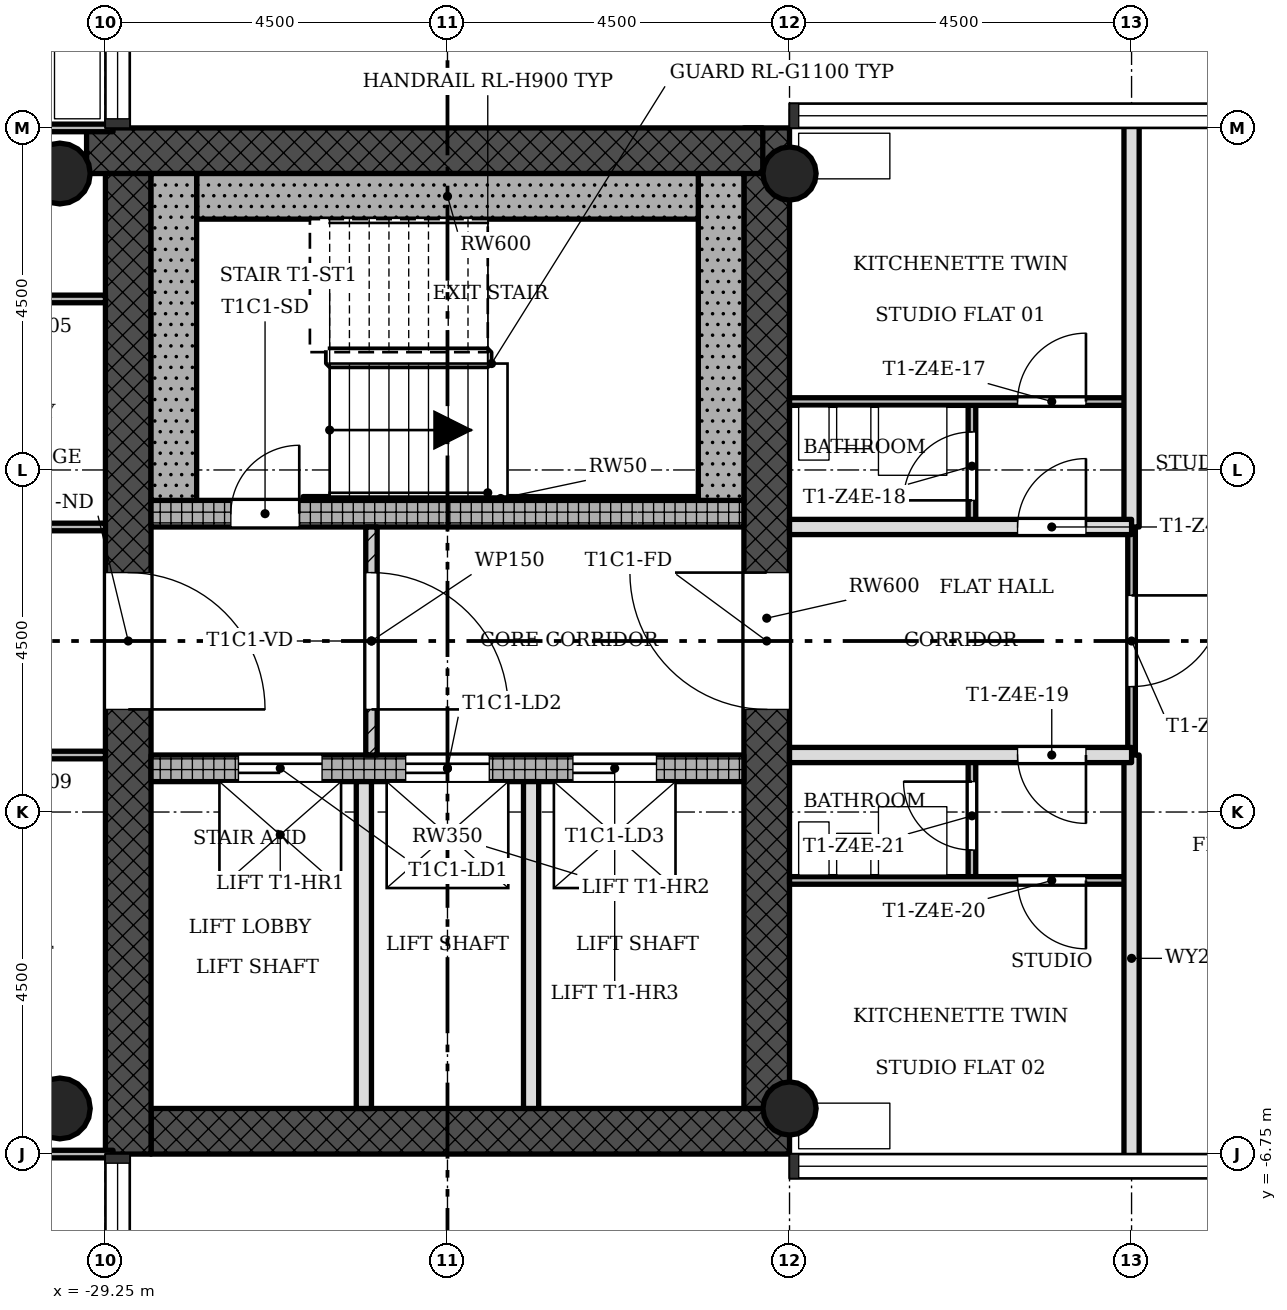
"""IFC4 building model, lengths in metres.
Left out: names, types, materials, properties, quantities, classifications, styles, units other than length and angle.
Written with IfcOpenShell. Run it as: python <this file> out.ifc"""

import sys

from ifc_helpers import new_model, si_unit, direction, frame, frame_2d, origin, origin_2d, place, context, subcontext, project, spatial, rectangle, hollow_circle, extrude, element, fill, save


model = new_model("IFC4")
c1 = context("Model", 3, precision=1e-05, world=origin(), true_north=direction((0.0, 1.0)))
c2 = subcontext(c1, "Body", "Model", "MODEL_VIEW")
j1 = project(units=[si_unit("LENGTHUNIT", "METRE"), si_unit("PLANEANGLEUNIT", "RADIAN")], contexts=[c1])
p1 = place(None, origin())
s1 = spatial("IfcSite", under=j1, at=p1, CompositionType="ELEMENT")
p2 = place(p1, origin())
s2 = spatial("IfcBuilding", under=s1, at=p2, CompositionType="ELEMENT")
p3 = place(p2, frame((0.0, 0.0, 213.0)))
s3 = spatial("IfcBuildingStorey", under=s2, at=p3, CompositionType="ELEMENT", Elevation=213.0)
p4 = place(p3, frame((-28.65, -6.45, 0.0), z_axis=(0.0, 0.0, 1.0), x_axis=(1.0, 0.0, 0.0)))
e1 = element("IfcWall", 1, at=p4, inside=s3, PredefinedType="SHEAR", context=c2, shape_type="SweptSolid", body=[
    extrude(rectangle(XDim=8.4, YDim=0.6, at=frame_2d((4.2, 0.0))), origin(), (0.0, 0.0, 1.0), 3.4),
])
p5 = place(p3, frame((-20.55, -6.15, 0.0), z_axis=(0.0, 0.0, 1.0), x_axis=(0.0, 1.0, 0.0)))
e2 = element("IfcWall", 2, at=p5, inside=s3, PredefinedType="SHEAR", context=c2, shape_type="SweptSolid", body=[
    extrude(rectangle(XDim=12.9, YDim=0.6, at=frame_2d((6.45, 0.0))), origin(), (0.0, 0.0, 1.0), 3.4),
])
p6 = place(p5, frame((5.25, 0.0, 0.0)))
e3 = element("IfcOpeningElement", 3, at=p6, cuts=e2, PredefinedType="OPENING", context=c2, shape_type="SweptSolid", body=[
    extrude(rectangle(XDim=1.8, YDim=2.1, at=frame_2d((0.9, 1.05))), frame((0.0, 0.31, 0.0), z_axis=(0.0, -1.0, 0.0), x_axis=(1.0, 0.0, 0.0)), (0.0, 0.0, 1.0), 0.62),
])
p7 = place(p3, frame((-20.602, 6.45, 0.0), z_axis=(0.0, 0.0, 1.0), x_axis=(-1.0, 0.0, 0.0)))
e4 = element("IfcWall", 4, at=p7, inside=s3, PredefinedType="SHEAR", context=c2, shape_type="SweptSolid", body=[
    extrude(rectangle(XDim=8.896, YDim=0.6, at=frame_2d((4.448, 0.0))), origin(), (0.0, 0.0, 1.0), 3.4),
])
p8 = place(p3, frame((-28.95, 6.15, 0.0), z_axis=(0.0, 0.0, 1.0), x_axis=(0.0, -1.0, 0.0)))
e5 = element("IfcWall", 5, at=p8, inside=s3, PredefinedType="SHEAR", context=c2, shape_type="SweptSolid", body=[
    extrude(rectangle(XDim=12.9, YDim=0.6, at=frame_2d((6.45, 0.0))), origin(), (0.0, 0.0, 1.0), 3.4),
])
p9 = place(p8, frame((5.25, 0.0, 0.0)))
e6 = element("IfcOpeningElement", 6, at=p9, cuts=e5, PredefinedType="OPENING", context=c2, shape_type="SweptSolid", body=[
    extrude(rectangle(XDim=1.8, YDim=2.1, at=frame_2d((0.9, 1.05))), frame((0.0, 0.31, 0.0), z_axis=(0.0, -1.0, 0.0), x_axis=(1.0, 0.0, 0.0)), (0.0, 0.0, 1.0), 0.62),
])
p10 = place(p3, frame((-28.65, -1.675, 0.0), z_axis=(0.0, 0.0, 1.0), x_axis=(1.0, 0.0, 0.0)))
e7 = element("IfcWall", 7, at=p10, inside=s3, PredefinedType="SHEAR", context=c2, shape_type="SweptSolid", body=[
    extrude(rectangle(XDim=7.8, YDim=0.35, at=frame_2d((3.9, 0.0))), origin(), (0.0, 0.0, 1.0), 3.4),
])
p11 = place(p10, frame((1.15, 0.0, 0.0)))
e8 = element("IfcOpeningElement", 8, at=p11, cuts=e7, PredefinedType="OPENING", context=c2, shape_type="SweptSolid", body=[
    extrude(rectangle(XDim=1.1, YDim=2.1, at=frame_2d((0.55, 1.05))), frame((0.0, 0.185, 0.0), z_axis=(0.0, -1.0, 0.0), x_axis=(1.0, 0.0, 0.0)), (0.0, 0.0, 1.0), 0.37),
])
p12 = place(p10, frame((3.35, 0.0, 0.0)))
e9 = element("IfcOpeningElement", 9, at=p12, cuts=e7, PredefinedType="OPENING", context=c2, shape_type="SweptSolid", body=[
    extrude(rectangle(XDim=1.1, YDim=2.1, at=frame_2d((0.55, 1.05))), frame((0.0, 0.185, 0.0), z_axis=(0.0, -1.0, 0.0), x_axis=(1.0, 0.0, 0.0)), (0.0, 0.0, 1.0), 0.37),
])
p13 = place(p10, frame((5.55, 0.0, 0.0)))
e10 = element("IfcOpeningElement", 10, at=p13, cuts=e7, PredefinedType="OPENING", context=c2, shape_type="SweptSolid", body=[
    extrude(rectangle(XDim=1.1, YDim=2.1, at=frame_2d((0.55, 1.05))), frame((0.0, 0.185, 0.0), z_axis=(0.0, -1.0, 0.0), x_axis=(1.0, 0.0, 0.0)), (0.0, 0.0, 1.0), 0.37),
])
p14 = place(p3, frame((-28.65, 1.675, 0.0), z_axis=(0.0, 0.0, 1.0), x_axis=(1.0, 0.0, 0.0)))
e11 = element("IfcWall", 11, at=p14, inside=s3, PredefinedType="SHEAR", context=c2, shape_type="SweptSolid", body=[
    extrude(rectangle(XDim=7.8, YDim=0.35, at=frame_2d((3.9, 0.0))), origin(), (0.0, 0.0, 1.0), 3.4),
])
p15 = place(p14, frame((1.05, 0.0, 0.0)))
e12 = element("IfcOpeningElement", 12, at=p15, cuts=e11, PredefinedType="OPENING", context=c2, shape_type="SweptSolid", body=[
    extrude(rectangle(XDim=0.9, YDim=2.1, at=frame_2d((0.45, 1.05))), frame((0.0, 0.185, 0.0), z_axis=(0.0, -1.0, 0.0), x_axis=(1.0, 0.0, 0.0)), (0.0, 0.0, 1.0), 0.37),
])
for number, where, z_axis, x_axis in (
    (13, (-20.25, -6.15, 0.0), (0.0, 0.0, 1.0), (1.0, 0.0, 0.0)),
    (14, (-20.25, 6.15, 0.0), (0.0, 0.0, 1.0), (1.0, 0.0, 0.0)),
):
    element("IfcColumn", number, at=place(p3, frame(where, z_axis=z_axis, x_axis=x_axis)), inside=s3, PredefinedType="COLUMN", context=c2, shape_type="SweptSolid", body=[
        extrude(hollow_circle(Radius=0.35, WallThickness=0.025, at=origin_2d()), origin(), (0.0, 0.0, 1.0), 3.4),
    ])
for number, where, z_axis, x_axis in (
    (15, (-29.85, -6.15, 0.0), (0.0, 0.0, 1.0), (1.0, 0.0, 0.0)),
    (16, (-29.85, 6.15, 0.0), (0.0, 0.0, 1.0), (1.0, 0.0, 0.0)),
):
    element("IfcColumn", number, at=place(p3, frame(where, z_axis=z_axis, x_axis=x_axis)), inside=s3, PredefinedType="COLUMN", context=c2, shape_type="SweptSolid", body=[
        extrude(hollow_circle(Radius=0.4, WallThickness=0.028, at=origin_2d()), origin(), (0.0, 0.0, 1.0), 3.4),
    ])
p16 = place(p3, frame((-25.75, -1.5, 0.0), z_axis=(0.0, 0.0, 1.0), x_axis=(0.0, 1.0, 0.0)))
e17 = element("IfcWall", 17, at=p16, inside=s3, PredefinedType="PARTITIONING", context=c2, shape_type="SweptSolid", body=[
    extrude(rectangle(XDim=3.0, YDim=0.15, at=frame_2d((1.5, 0.0))), origin(), (0.0, 0.0, 1.0), 3.0),
])
p17 = place(p16, frame((0.6, 0.0, 0.0)))
e18 = element("IfcOpeningElement", 18, at=p17, cuts=e17, PredefinedType="OPENING", context=c2, shape_type="SweptSolid", body=[
    extrude(rectangle(XDim=1.8, YDim=2.1, at=frame_2d((0.9, 1.05))), frame((0.0, 0.085, 0.0), z_axis=(0.0, -1.0, 0.0), x_axis=(1.0, 0.0, 0.0)), (0.0, 0.0, 1.0), 0.17),
])
for number, where, z_axis, x_axis in (
    (19, (-25.85, -6.15, 0.0), (0.0, 0.0, 1.0), (0.0, 1.0, 0.0)),
    (20, (-23.65, -6.15, 0.0), (0.0, 0.0, 1.0), (0.0, 1.0, 0.0)),
):
    element("IfcWall", number, at=place(p3, frame(where, z_axis=z_axis, x_axis=x_axis)), inside=s3, PredefinedType="SOLIDWALL", context=c2, shape_type="SweptSolid", body=[
        extrude(rectangle(XDim=4.3, YDim=0.2, at=frame_2d((2.15, 0.0))), origin(), (0.0, 0.0, 1.0), 3.0),
    ])
p18 = place(p3, frame((-17.85, -3.15, 0.0), z_axis=(0.0, 0.0, 1.0), x_axis=(0.0, 1.0, 0.0)))
e21 = element("IfcWall", 21, at=p18, inside=s3, PredefinedType="PARTITIONING", context=c2, shape_type="SweptSolid", body=[
    extrude(rectangle(XDim=1.65, YDim=0.1, at=frame_2d((0.825, 0.0))), origin(), (0.0, 0.0, 1.0), 3.0),
])
p19 = place(p18, frame((0.4, 0.0, 0.0)))
e22 = element("IfcOpeningElement", 22, at=p19, cuts=e21, PredefinedType="OPENING", context=c2, shape_type="SweptSolid", body=[
    extrude(rectangle(XDim=0.9, YDim=2.1, at=frame_2d((0.45, 1.05))), frame((0.0, 0.06, 0.0), z_axis=(0.0, -1.0, 0.0), x_axis=(1.0, 0.0, 0.0)), (0.0, 0.0, 1.0), 0.12),
])
p20 = place(p3, frame((-17.85, 1.5, 0.0), z_axis=(0.0, 0.0, 1.0), x_axis=(0.0, 1.0, 0.0)))
e23 = element("IfcWall", 23, at=p20, inside=s3, PredefinedType="PARTITIONING", context=c2, shape_type="SweptSolid", body=[
    extrude(rectangle(XDim=1.65, YDim=0.1, at=frame_2d((0.825, 0.0))), origin(), (0.0, 0.0, 1.0), 3.0),
])
p21 = place(p20, frame((0.35, 0.0, 0.0)))
e24 = element("IfcOpeningElement", 24, at=p21, cuts=e23, PredefinedType="OPENING", context=c2, shape_type="SweptSolid", body=[
    extrude(rectangle(XDim=0.9, YDim=2.1, at=frame_2d((0.45, 1.05))), frame((0.0, 0.06, 0.0), z_axis=(0.0, -1.0, 0.0), x_axis=(1.0, 0.0, 0.0)), (0.0, 0.0, 1.0), 0.12),
])
p22 = place(p3, frame((-15.75, -1.5, 0.0), z_axis=(0.0, 0.0, 1.0), x_axis=(0.0, 1.0, 0.0)))
e25 = element("IfcWall", 25, at=p22, inside=s3, PredefinedType="PARTITIONING", context=c2, shape_type="SweptSolid", body=[
    extrude(rectangle(XDim=3.0, YDim=0.1, at=frame_2d((1.5, 0.0))), origin(), (0.0, 0.0, 1.0), 3.0),
])
p23 = place(p22, frame((0.9, 0.0, 0.0)))
e26 = element("IfcOpeningElement", 26, at=p23, cuts=e25, PredefinedType="OPENING", context=c2, shape_type="SweptSolid", body=[
    extrude(rectangle(XDim=1.2, YDim=2.1, at=frame_2d((0.6, 1.05))), frame((0.0, 0.06, 0.0), z_axis=(0.0, -1.0, 0.0), x_axis=(1.0, 0.0, 0.0)), (0.0, 0.0, 1.0), 0.12),
])
for number, where, z_axis, x_axis in (
    (27, (-15.75, -6.85, 0.0), (0.0, 0.0, 1.0), (0.0, 1.0, 0.0)),
    (28, (-15.75, 1.5, 0.0), (0.0, 0.0, 1.0), (0.0, 1.0, 0.0)),
):
    element("IfcWall", number, at=place(p3, frame(where, z_axis=z_axis, x_axis=x_axis)), inside=s3, PredefinedType="SOLIDWALL", context=c2, shape_type="SweptSolid", body=[
        extrude(rectangle(XDim=5.35, YDim=0.2, at=frame_2d((2.675, 0.0))), origin(), (0.0, 0.0, 1.0), 3.0),
    ])
p24 = place(p3, frame((-35.1, -6.75, 0.0), z_axis=(0.0, 0.0, 1.0), x_axis=(1.0, 0.0, 0.0)))
e29 = element("IfcWall", 29, at=p24, inside=s3, PredefinedType="PARTITIONING", context=c2, shape_type="SweptSolid", body=[
    extrude(rectangle(XDim=5.95, YDim=0.1, at=frame_2d((2.975, 0.0))), origin(), (0.0, 0.0, 1.0), 3.0),
])
p25 = place(p3, frame((-20.25, -3.15, 0.0), z_axis=(0.0, 0.0, 1.0), x_axis=(1.0, 0.0, 0.0)))
e30 = element("IfcWall", 30, at=p25, inside=s3, PredefinedType="PARTITIONING", context=c2, shape_type="SweptSolid", body=[
    extrude(rectangle(XDim=4.5, YDim=0.1, at=frame_2d((2.25, 0.0))), origin(), (0.0, 0.0, 1.0), 3.0),
])
p26 = place(p25, frame((3.0, 0.0, 0.0)))
e31 = element("IfcOpeningElement", 31, at=p26, cuts=e30, PredefinedType="OPENING", context=c2, shape_type="SweptSolid", body=[
    extrude(rectangle(XDim=0.9, YDim=2.1, at=frame_2d((0.45, 1.05))), frame((0.0, 0.06, 0.0), z_axis=(0.0, -1.0, 0.0), x_axis=(1.0, 0.0, 0.0)), (0.0, 0.0, 1.0), 0.12),
])
p27 = place(p3, frame((-31.5, -1.5, 0.0), z_axis=(0.0, 0.0, 1.0), x_axis=(1.0, 0.0, 0.0)))
e32 = element("IfcWall", 32, at=p27, inside=s3, PredefinedType="PARTITIONING", context=c2, shape_type="SweptSolid", body=[
    extrude(rectangle(XDim=2.25, YDim=0.1, at=frame_2d((1.125, 0.0))), origin(), (0.0, 0.0, 1.0), 3.0),
])
p28 = place(p3, frame((-20.25, -1.5, 0.0), z_axis=(0.0, 0.0, 1.0), x_axis=(1.0, 0.0, 0.0)))
e33 = element("IfcWall", 33, at=p28, inside=s3, PredefinedType="SOLIDWALL", context=c2, shape_type="SweptSolid", body=[
    extrude(rectangle(XDim=4.5, YDim=0.2, at=frame_2d((2.25, 0.0))), origin(), (0.0, 0.0, 1.0), 3.0),
])
p29 = place(p28, frame((3.0, 0.0, 0.0)))
e34 = element("IfcOpeningElement", 34, at=p29, cuts=e33, PredefinedType="OPENING", context=c2, shape_type="SweptSolid", body=[
    extrude(rectangle(XDim=0.9, YDim=2.1, at=frame_2d((0.45, 1.05))), frame((0.0, 0.11, 0.0), z_axis=(0.0, -1.0, 0.0), x_axis=(1.0, 0.0, 0.0)), (0.0, 0.0, 1.0), 0.22),
])
p30 = place(p3, frame((-31.5, 1.5, 0.0), z_axis=(0.0, 0.0, 1.0), x_axis=(1.0, 0.0, 0.0)))
e35 = element("IfcWall", 35, at=p30, inside=s3, PredefinedType="PARTITIONING", context=c2, shape_type="SweptSolid", body=[
    extrude(rectangle(XDim=2.25, YDim=0.1, at=frame_2d((1.125, 0.0))), origin(), (0.0, 0.0, 1.0), 3.0),
])
p31 = place(p3, frame((-20.25, 1.5, 0.0), z_axis=(0.0, 0.0, 1.0), x_axis=(1.0, 0.0, 0.0)))
e36 = element("IfcWall", 36, at=p31, inside=s3, PredefinedType="SOLIDWALL", context=c2, shape_type="SweptSolid", body=[
    extrude(rectangle(XDim=4.5, YDim=0.2, at=frame_2d((2.25, 0.0))), origin(), (0.0, 0.0, 1.0), 3.0),
])
p32 = place(p31, frame((3.0, 0.0, 0.0)))
e37 = element("IfcOpeningElement", 37, at=p32, cuts=e36, PredefinedType="OPENING", context=c2, shape_type="SweptSolid", body=[
    extrude(rectangle(XDim=0.9, YDim=2.1, at=frame_2d((0.45, 1.05))), frame((0.0, 0.11, 0.0), z_axis=(0.0, -1.0, 0.0), x_axis=(1.0, 0.0, 0.0)), (0.0, 0.0, 1.0), 0.22),
])
p33 = place(p3, frame((-20.25, 3.15, 0.0), z_axis=(0.0, 0.0, 1.0), x_axis=(1.0, 0.0, 0.0)))
e38 = element("IfcWall", 38, at=p33, inside=s3, PredefinedType="PARTITIONING", context=c2, shape_type="SweptSolid", body=[
    extrude(rectangle(XDim=4.5, YDim=0.1, at=frame_2d((2.25, 0.0))), origin(), (0.0, 0.0, 1.0), 3.0),
])
p34 = place(p33, frame((3.0, 0.0, 0.0)))
e39 = element("IfcOpeningElement", 39, at=p34, cuts=e38, PredefinedType="OPENING", context=c2, shape_type="SweptSolid", body=[
    extrude(rectangle(XDim=0.9, YDim=2.1, at=frame_2d((0.45, 1.05))), frame((0.0, 0.06, 0.0), z_axis=(0.0, -1.0, 0.0), x_axis=(1.0, 0.0, 0.0)), (0.0, 0.0, 1.0), 0.12),
])
p35 = place(p3, frame((-35.1, 4.5, 0.0), z_axis=(0.0, 0.0, 1.0), x_axis=(1.0, 0.0, 0.0)))
e40 = element("IfcWall", 40, at=p35, inside=s3, PredefinedType="PARTITIONING", context=c2, shape_type="SweptSolid", body=[
    extrude(rectangle(XDim=5.85, YDim=0.1, at=frame_2d((2.925, 0.0))), origin(), (0.0, 0.0, 1.0), 3.0),
])
p36 = place(p35, frame((1.35, 0.0, 0.0)))
e41 = element("IfcOpeningElement", 41, at=p36, cuts=e40, PredefinedType="OPENING", context=c2, shape_type="SweptSolid", body=[
    extrude(rectangle(XDim=0.9, YDim=2.1, at=frame_2d((0.45, 1.05))), frame((0.0, 0.06, 0.0), z_axis=(0.0, -1.0, 0.0), x_axis=(1.0, 0.0, 0.0)), (0.0, 0.0, 1.0), 0.12),
])
p37 = place(p3, frame((-35.1, 6.75, 0.0), z_axis=(0.0, 0.0, 1.0), x_axis=(1.0, 0.0, 0.0)))
e42 = element("IfcWall", 42, at=p37, inside=s3, PredefinedType="PARTITIONING", context=c2, shape_type="SweptSolid", body=[
    extrude(rectangle(XDim=5.95, YDim=0.1, at=frame_2d((2.975, 0.0))), origin(), (0.0, 0.0, 1.0), 3.0),
])
p38 = place(p3, frame((-21.15, 1.85, 0.0), z_axis=(0.0, 0.0, 1.0), x_axis=(0.0, 1.0, 0.0)))
e43 = element("IfcWall", 43, at=p38, inside=s3, PredefinedType="SHEAR", context=c2, shape_type="SweptSolid", body=[
    extrude(rectangle(XDim=4.3, YDim=0.6, at=frame_2d((2.15, 0.0))), origin(), (0.0, 0.0, 1.0), 3.4),
])
p39 = place(p3, frame((-28.05, 5.85, 0.0), z_axis=(0.0, 0.0, 1.0), x_axis=(1.0, 0.0, 0.0)))
e44 = element("IfcWall", 44, at=p39, inside=s3, PredefinedType="SHEAR", context=c2, shape_type="SweptSolid", body=[
    extrude(rectangle(XDim=6.6, YDim=0.6, at=frame_2d((3.3, 0.0))), origin(), (0.0, 0.0, 1.0), 3.4),
])
p40 = place(p3, frame((-28.35, 1.85, 0.0), z_axis=(0.0, 0.0, 1.0), x_axis=(0.0, 1.0, 0.0)))
e45 = element("IfcWall", 45, at=p40, inside=s3, PredefinedType="SHEAR", context=c2, shape_type="SweptSolid", body=[
    extrude(rectangle(XDim=4.3, YDim=0.6, at=frame_2d((2.15, 0.0))), origin(), (0.0, 0.0, 1.0), 3.4),
])
p41 = place(p3, frame((-26.65, 1.875, 0.0), z_axis=(0.0, 0.0, 1.0), x_axis=(1.0, 0.0, 0.0)))
e46 = element("IfcWall", 46, at=p41, inside=s3, PredefinedType="SHEAR", context=c2, shape_type="SweptSolid", body=[
    extrude(rectangle(XDim=5.2, YDim=0.05, at=frame_2d((2.6, 0.0))), origin(), (0.0, 0.0, 1.0), 3.4),
])
p42 = place(p17, origin())
e47 = element("IfcDoor", 47, at=p42, inside=s3, OperationType="SINGLE_SWING_LEFT", PredefinedType="DOOR", context=c2, shape_type="SweptSolid", body=[
    extrude(rectangle(XDim=1.8, YDim=2.1, at=frame_2d((0.9, 1.05))), frame((0.0, 0.025, 0.0), z_axis=(0.0, -1.0, 0.0), x_axis=(1.0, 0.0, 0.0)), (0.0, 0.0, 1.0), 0.05),
])
fill(e18, e47)
p43 = place(p32, origin())
e48 = element("IfcDoor", 48, at=p43, inside=s3, OperationType="SINGLE_SWING_LEFT", PredefinedType="DOOR", context=c2, shape_type="SweptSolid", body=[
    extrude(rectangle(XDim=0.9, YDim=2.1, at=frame_2d((0.45, 1.05))), frame((0.0, 0.025, 0.0), z_axis=(0.0, -1.0, 0.0), x_axis=(1.0, 0.0, 0.0)), (0.0, 0.0, 1.0), 0.05),
])
fill(e37, e48)
p44 = place(p34, origin())
e49 = element("IfcDoor", 49, at=p44, inside=s3, OperationType="SINGLE_SWING_LEFT", PredefinedType="DOOR", context=c2, shape_type="SweptSolid", body=[
    extrude(rectangle(XDim=0.9, YDim=2.1, at=frame_2d((0.45, 1.05))), frame((0.0, 0.025, 0.0), z_axis=(0.0, -1.0, 0.0), x_axis=(1.0, 0.0, 0.0)), (0.0, 0.0, 1.0), 0.05),
])
fill(e39, e49)
p45 = place(p21, origin())
e50 = element("IfcDoor", 50, at=p45, inside=s3, OperationType="SINGLE_SWING_RIGHT", PredefinedType="DOOR", context=c2, shape_type="SweptSolid", body=[
    extrude(rectangle(XDim=0.9, YDim=2.1, at=frame_2d((0.45, 1.05))), frame((0.0, 0.025, 0.0), z_axis=(0.0, -1.0, 0.0), x_axis=(1.0, 0.0, 0.0)), (0.0, 0.0, 1.0), 0.05),
])
fill(e24, e50)
p46 = place(p29, origin())
e51 = element("IfcDoor", 51, at=p46, inside=s3, OperationType="SINGLE_SWING_RIGHT", PredefinedType="DOOR", context=c2, shape_type="SweptSolid", body=[
    extrude(rectangle(XDim=0.9, YDim=2.1, at=frame_2d((0.45, 1.05))), frame((0.0, 0.025, 0.0), z_axis=(0.0, -1.0, 0.0), x_axis=(1.0, 0.0, 0.0)), (0.0, 0.0, 1.0), 0.05),
])
fill(e34, e51)
p47 = place(p26, origin())
e52 = element("IfcDoor", 52, at=p47, inside=s3, OperationType="SINGLE_SWING_RIGHT", PredefinedType="DOOR", context=c2, shape_type="SweptSolid", body=[
    extrude(rectangle(XDim=0.9, YDim=2.1, at=frame_2d((0.45, 1.05))), frame((0.0, 0.025, 0.0), z_axis=(0.0, -1.0, 0.0), x_axis=(1.0, 0.0, 0.0)), (0.0, 0.0, 1.0), 0.05),
])
fill(e31, e52)
p48 = place(p19, origin())
e53 = element("IfcDoor", 53, at=p48, inside=s3, OperationType="SINGLE_SWING_LEFT", PredefinedType="DOOR", context=c2, shape_type="SweptSolid", body=[
    extrude(rectangle(XDim=0.9, YDim=2.1, at=frame_2d((0.45, 1.05))), frame((0.0, 0.025, 0.0), z_axis=(0.0, -1.0, 0.0), x_axis=(1.0, 0.0, 0.0)), (0.0, 0.0, 1.0), 0.05),
])
fill(e22, e53)
p49 = place(p23, origin())
e54 = element("IfcDoor", 54, at=p49, inside=s3, OperationType="SINGLE_SWING_RIGHT", PredefinedType="DOOR", context=c2, shape_type="SweptSolid", body=[
    extrude(rectangle(XDim=1.2, YDim=2.1, at=frame_2d((0.6, 1.05))), frame((0.0, 0.025, 0.0), z_axis=(0.0, -1.0, 0.0), x_axis=(1.0, 0.0, 0.0)), (0.0, 0.0, 1.0), 0.05),
])
fill(e26, e54)
p50 = place(p15, origin())
e55 = element("IfcDoor", 55, at=p50, inside=s3, OperationType="SINGLE_SWING_LEFT", PredefinedType="DOOR", context=c2, shape_type="SweptSolid", body=[
    extrude(rectangle(XDim=0.9, YDim=2.1, at=frame_2d((0.45, 1.05))), frame((0.0, 0.025, 0.0), z_axis=(0.0, -1.0, 0.0), x_axis=(1.0, 0.0, 0.0)), (0.0, 0.0, 1.0), 0.05),
])
fill(e12, e55)
p51 = place(p11, origin())
e56 = element("IfcDoor", 56, at=p51, inside=s3, OperationType="SLIDING_TO_LEFT", PredefinedType="DOOR", context=c2, shape_type="SweptSolid", body=[
    extrude(rectangle(XDim=1.1, YDim=2.1, at=frame_2d((0.55, 1.05))), frame((0.0, 0.025, 0.0), z_axis=(0.0, -1.0, 0.0), x_axis=(1.0, 0.0, 0.0)), (0.0, 0.0, 1.0), 0.05),
])
fill(e8, e56)
p52 = place(p12, origin())
e57 = element("IfcDoor", 57, at=p52, inside=s3, OperationType="SLIDING_TO_LEFT", PredefinedType="DOOR", context=c2, shape_type="SweptSolid", body=[
    extrude(rectangle(XDim=1.1, YDim=2.1, at=frame_2d((0.55, 1.05))), frame((0.0, 0.025, 0.0), z_axis=(0.0, -1.0, 0.0), x_axis=(1.0, 0.0, 0.0)), (0.0, 0.0, 1.0), 0.05),
])
fill(e9, e57)
p53 = place(p13, origin())
e58 = element("IfcDoor", 58, at=p53, inside=s3, OperationType="SLIDING_TO_LEFT", PredefinedType="DOOR", context=c2, shape_type="SweptSolid", body=[
    extrude(rectangle(XDim=1.1, YDim=2.1, at=frame_2d((0.55, 1.05))), frame((0.0, 0.025, 0.0), z_axis=(0.0, -1.0, 0.0), x_axis=(1.0, 0.0, 0.0)), (0.0, 0.0, 1.0), 0.05),
])
fill(e10, e58)
p54 = place(p9, origin())
e59 = element("IfcDoor", 59, at=p54, inside=s3, OperationType="SINGLE_SWING_LEFT", PredefinedType="DOOR", context=c2, shape_type="SweptSolid", body=[
    extrude(rectangle(XDim=1.8, YDim=2.1, at=frame_2d((0.9, 1.05))), frame((0.0, 0.025, 0.0), z_axis=(0.0, -1.0, 0.0), x_axis=(1.0, 0.0, 0.0)), (0.0, 0.0, 1.0), 0.05),
])
fill(e6, e59)
p55 = place(p6, origin())
e60 = element("IfcDoor", 60, at=p55, inside=s3, OperationType="SINGLE_SWING_LEFT", PredefinedType="DOOR", context=c2, shape_type="SweptSolid", body=[
    extrude(rectangle(XDim=1.8, YDim=2.1, at=frame_2d((0.9, 1.05))), frame((0.0, 0.025, 0.0), z_axis=(0.0, -1.0, 0.0), x_axis=(1.0, 0.0, 0.0)), (0.0, 0.0, 1.0), 0.05),
])
fill(e3, e60)
save(model, sys.argv[1])
